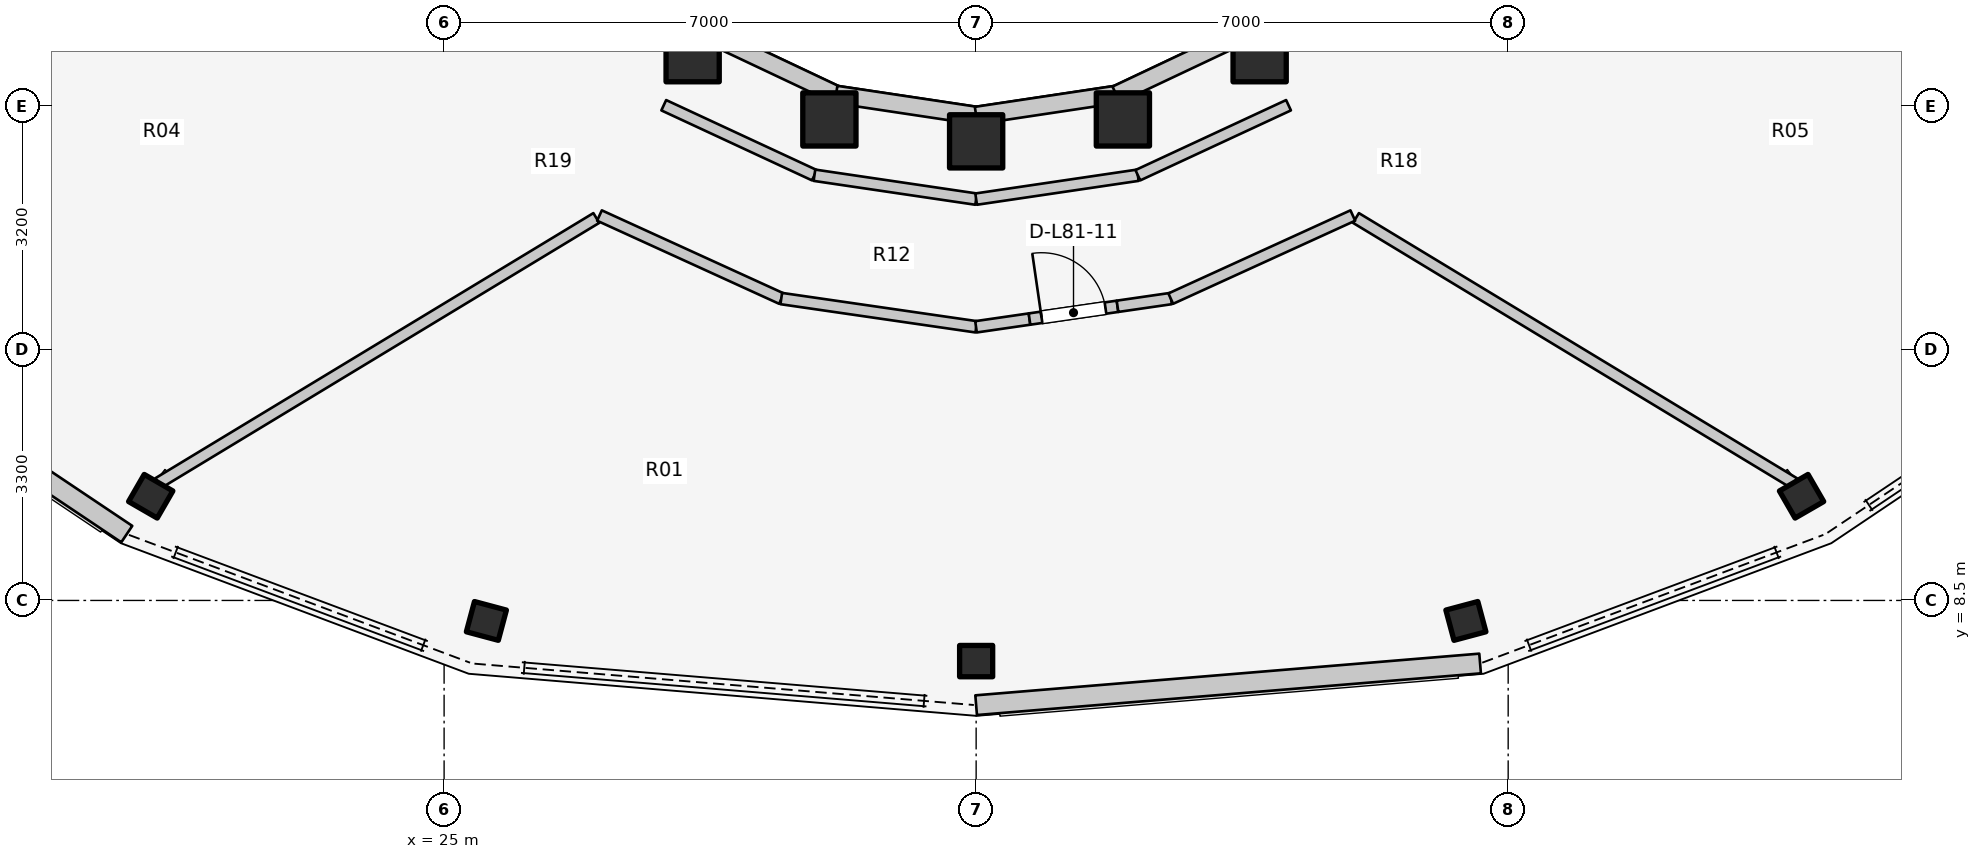
"""IFC4 building model, lengths in metres.
Left out: names, types, materials, properties, quantities, classifications, styles, units other than length and angle.
Written with IfcOpenShell. Run it as: python <this file> out.ifc"""

import sys

from ifc_helpers import new_model, si_unit, direction, frame, frame_2d, origin, origin_2d, place, context, subcontext, project, spatial, rectangle, i_section, extrude, element, fill, save


model = new_model("IFC4")
c1 = context("Model", 3, precision=1e-05, world=origin(), true_north=direction((0.0, 1.0)))
c2 = subcontext(c1, "Body", "Model", "MODEL_VIEW")
j1 = project(units=[si_unit("LENGTHUNIT", "METRE"), si_unit("PLANEANGLEUNIT", "RADIAN")], contexts=[c1])
p1 = place(None, origin())
s1 = spatial("IfcSite", under=j1, at=p1, CompositionType="ELEMENT")
p2 = place(p1, origin())
s2 = spatial("IfcBuilding", under=s1, at=p2, CompositionType="ELEMENT")
p3 = place(p2, frame((0.0, 0.0, 266.8)))
s3 = spatial("IfcBuildingStorey", under=s2, at=p3, CompositionType="ELEMENT", Elevation=266.8)
p4 = place(p3, frame((28.27, 15.673, 0.0), z_axis=(0.0, 0.0, 1.0), x_axis=(1.0, 0.0, 0.0)))
e1 = element("IfcColumn", 1, at=p4, inside=s3, PredefinedType="COLUMN", context=c2, shape_type="SweptSolid", body=[
    extrude(rectangle(XDim=0.7, YDim=0.7, at=origin_2d()), origin(), (0.0, 0.0, 1.0), 3.2),
])
p5 = place(p3, frame((21.14, 9.871, 0.0), z_axis=(0.0, 0.0, 1.0), x_axis=(-0.5, -0.866025403784, 0.0)))
e2 = element("IfcColumn", 2, at=p5, inside=s3, PredefinedType="COLUMN", context=c2, shape_type="SweptSolid", body=[
    extrude(i_section(OverallWidth=0.412, OverallDepth=0.435, WebThickness=0.036, FlangeThickness=0.057, FilletRadius=0.025, at=origin_2d()), origin(), (0.0, 0.0, 1.0), 3.2),
])
p6 = place(p3, frame((30.069, 14.828, 0.0), z_axis=(0.0, 0.0, 1.0), x_axis=(1.0, 0.0, 0.0)))
e3 = element("IfcColumn", 3, at=p6, inside=s3, PredefinedType="COLUMN", context=c2, shape_type="SweptSolid", body=[
    extrude(rectangle(XDim=0.7, YDim=0.7, at=origin_2d()), origin(), (0.0, 0.0, 1.0), 3.2),
])
p7 = place(p3, frame((25.556, 8.23, 0.0), z_axis=(0.0, 0.0, 1.0), x_axis=(-0.258819045103, -0.965925826289, 0.0)))
e4 = element("IfcColumn", 4, at=p7, inside=s3, PredefinedType="COLUMN", context=c2, shape_type="SweptSolid", body=[
    extrude(i_section(OverallWidth=0.412, OverallDepth=0.435, WebThickness=0.036, FlangeThickness=0.057, FilletRadius=0.025, at=origin_2d()), origin(), (0.0, 0.0, 1.0), 3.2),
])
p8 = place(p3, frame((32.0, 14.54, 0.0), z_axis=(0.0, 0.0, 1.0), x_axis=(1.0, 0.0, 0.0)))
e5 = element("IfcColumn", 5, at=p8, inside=s3, PredefinedType="COLUMN", context=c2, shape_type="SweptSolid", body=[
    extrude(rectangle(XDim=0.7, YDim=0.7, at=origin_2d()), origin(), (0.0, 0.0, 1.0), 3.2),
])
p9 = place(p3, frame((32.0, 7.702, 0.0), z_axis=(0.0, 0.0, 1.0), x_axis=(0.0, -1.0, 0.0)))
e6 = element("IfcColumn", 6, at=p9, inside=s3, PredefinedType="COLUMN", context=c2, shape_type="SweptSolid", body=[
    extrude(i_section(OverallWidth=0.412, OverallDepth=0.435, WebThickness=0.036, FlangeThickness=0.057, FilletRadius=0.025, at=origin_2d()), origin(), (0.0, 0.0, 1.0), 3.2),
])
p10 = place(p3, frame((33.931, 14.828, 0.0), z_axis=(0.0, 0.0, 1.0), x_axis=(1.0, 0.0, 0.0)))
e7 = element("IfcColumn", 7, at=p10, inside=s3, PredefinedType="COLUMN", context=c2, shape_type="SweptSolid", body=[
    extrude(rectangle(XDim=0.7, YDim=0.7, at=origin_2d()), origin(), (0.0, 0.0, 1.0), 3.2),
])
p11 = place(p3, frame((38.444, 8.23, 0.0), z_axis=(0.0, 0.0, 1.0), x_axis=(0.258819045103, -0.965925826289, 0.0)))
e8 = element("IfcColumn", 8, at=p11, inside=s3, PredefinedType="COLUMN", context=c2, shape_type="SweptSolid", body=[
    extrude(i_section(OverallWidth=0.412, OverallDepth=0.435, WebThickness=0.036, FlangeThickness=0.057, FilletRadius=0.025, at=origin_2d()), origin(), (0.0, 0.0, 1.0), 3.2),
])
p12 = place(p3, frame((35.73, 15.673, 0.0), z_axis=(0.0, 0.0, 1.0), x_axis=(1.0, 0.0, 0.0)))
e9 = element("IfcColumn", 9, at=p12, inside=s3, PredefinedType="COLUMN", context=c2, shape_type="SweptSolid", body=[
    extrude(rectangle(XDim=0.7, YDim=0.7, at=origin_2d()), origin(), (0.0, 0.0, 1.0), 3.2),
])
p13 = place(p3, frame((42.86, 9.871, 0.0), z_axis=(0.0, 0.0, 1.0), x_axis=(0.5, -0.866025403784, 0.0)))
e10 = element("IfcColumn", 10, at=p13, inside=s3, PredefinedType="COLUMN", context=c2, shape_type="SweptSolid", body=[
    extrude(i_section(OverallWidth=0.412, OverallDepth=0.435, WebThickness=0.036, FlangeThickness=0.057, FilletRadius=0.025, at=origin_2d()), origin(), (0.0, 0.0, 1.0), 3.2),
])
p14 = place(p3, frame((28.44, 15.968, 0.0), z_axis=(0.0, 0.0, 1.0), x_axis=(0.904179699603, -0.427152280606, 0.0)))
e11 = element("IfcWall", 11, at=p14, inside=s3, PredefinedType="STANDARD", context=c2, shape_type="SweptSolid", body=[
    extrude(rectangle(XDim=1.899, YDim=0.23, at=frame_2d((0.95, 0.0))), origin(), (0.0, 0.0, 1.0), 1.32),
])
for number, where, z_axis, x_axis in (
    (12, (30.157, 15.157, 0.0), (0.0, 0.0, 1.0), (0.989, -0.149, 0.0)),
    (13, (32.0, 14.88, 0.0), (0.0, 0.0, 1.0), (0.989, 0.149, 0.0)),
):
    element("IfcWall", number, at=place(p3, frame(where, z_axis=z_axis, x_axis=x_axis)), inside=s3, PredefinedType="STANDARD", context=c2, shape_type="SweptSolid", body=[
        extrude(rectangle(XDim=1.864, YDim=0.23, at=frame_2d((0.932, 0.0))), origin(), (0.0, 0.0, 1.0), 1.32),
    ])
p15 = place(p3, frame((33.843, 15.157, 0.0), z_axis=(0.0, 0.0, 1.0), x_axis=(0.904179699603, 0.427152280606, 0.0)))
e14 = element("IfcWall", 14, at=p15, inside=s3, PredefinedType="STANDARD", context=c2, shape_type="SweptSolid", body=[
    extrude(rectangle(XDim=1.899, YDim=0.23, at=frame_2d((0.95, 0.0))), origin(), (0.0, 0.0, 1.0), 1.32),
])
p16 = place(p3, frame((17.353, 11.7, 0.0), z_axis=(0.0, 0.0, 1.0), x_axis=(0.830699736256, -0.556720709319, 0.0)))
e15 = element("IfcWall", 15, at=p16, inside=s3, PredefinedType="STANDARD", context=c2, shape_type="SweptSolid", body=[
    extrude(rectangle(XDim=4.179, YDim=0.26, at=frame_2d((2.09, 0.0))), origin(), (0.0, 0.0, 1.0), 1.32),
])
p17 = place(p3, frame((32.0, 7.122, 0.0), z_axis=(0.0, 0.0, 1.0), x_axis=(0.996594930521, 0.08245328653, 0.0)))
e16 = element("IfcWall", 16, at=p17, inside=s3, PredefinedType="STANDARD", context=c2, shape_type="SweptSolid", body=[
    extrude(rectangle(XDim=6.653, YDim=0.26, at=frame_2d((3.327, 0.0))), origin(), (0.0, 0.0, 1.0), 1.32),
])
p18 = place(p3, frame((27.89, 15.015, 0.0), z_axis=(0.0, 0.0, 1.0), x_axis=(0.906943449489, -0.421252393975, 0.0)))
e17 = element("IfcWall", 17, at=p18, inside=s3, PredefinedType="PARTITIONING", context=c2, shape_type="SweptSolid", body=[
    extrude(rectangle(XDim=2.186, YDim=0.15, at=frame_2d((1.093, 0.0))), origin(), (0.0, 0.0, 1.0), 1.32),
])
for number, where, z_axis, x_axis in (
    (18, (29.873, 14.094, 0.0), (0.0, 0.0, 1.0), (0.989, -0.146, 0.0)),
    (19, (32.0, 13.78, 0.0), (0.0, 0.0, 1.0), (0.989, 0.146, 0.0)),
):
    element("IfcWall", number, at=place(p3, frame(where, z_axis=z_axis, x_axis=x_axis)), inside=s3, PredefinedType="PARTITIONING", context=c2, shape_type="SweptSolid", body=[
        extrude(rectangle(XDim=2.151, YDim=0.15, at=frame_2d((1.075, 0.0))), origin(), (0.0, 0.0, 1.0), 1.32),
    ])
p19 = place(p3, frame((34.127, 14.094, 0.0), z_axis=(0.0, 0.0, 1.0), x_axis=(0.906943449489, 0.421252393975, 0.0)))
e20 = element("IfcWall", 20, at=p19, inside=s3, PredefinedType="PARTITIONING", context=c2, shape_type="SweptSolid", body=[
    extrude(rectangle(XDim=2.186, YDim=0.15, at=frame_2d((1.093, 0.0))), origin(), (0.0, 0.0, 1.0), 1.32),
])
for number, where, z_axis, x_axis in (
    (21, (27.003, 13.532, 0.0), (0.0, 0.0, 1.0), (-0.856, -0.518, 0.0)),
    (22, (36.997, 13.532, 0.0), (0.0, 0.0, 1.0), (0.856, -0.518, 0.0)),
):
    element("IfcWall", number, at=place(p3, frame(where, z_axis=z_axis, x_axis=x_axis)), inside=s3, PredefinedType="PARTITIONING", context=c2, shape_type="SweptSolid", body=[
        extrude(rectangle(XDim=6.736, YDim=0.15, at=frame_2d((3.368, 0.0))), origin(), (0.0, 0.0, 1.0), 1.32),
    ])
p20 = place(p3, frame((27.044, 13.564, 0.0), z_axis=(0.0, 0.0, 1.0), x_axis=(0.909736731002, -0.415185597373, 0.0)))
e23 = element("IfcWall", 23, at=p20, inside=s3, PredefinedType="PARTITIONING", context=c2, shape_type="SweptSolid", body=[
    extrude(rectangle(XDim=2.633, YDim=0.15, at=frame_2d((1.317, 0.0))), origin(), (0.0, 0.0, 1.0), 1.32),
])
p21 = place(p3, frame((29.436, 12.472, 0.0), z_axis=(0.0, 0.0, 1.0), x_axis=(0.989661180186, -0.143425062082, 0.0)))
e24 = element("IfcWall", 24, at=p21, inside=s3, PredefinedType="PARTITIONING", context=c2, shape_type="SweptSolid", body=[
    extrude(rectangle(XDim=2.593, YDim=0.15, at=frame_2d((1.296, 0.0))), origin(), (0.0, 0.0, 1.0), 1.32),
])
p22 = place(p3, frame((31.998, 12.1, 0.0), z_axis=(0.0, 0.0, 1.0), x_axis=(0.989700813976, 0.143151314404, 0.0)))
e25 = element("IfcWall", 25, at=p22, inside=s3, PredefinedType="PARTITIONING", context=c2, shape_type="SweptSolid", body=[
    extrude(rectangle(XDim=0.711, YDim=0.15, at=frame_2d((0.355, 0.0))), origin(), (0.0, 0.0, 1.0), 1.32),
])
p23 = place(p3, frame((32.702, 12.202, 0.0), z_axis=(0.0, 0.0, 1.0), x_axis=(0.989642563126, 0.143553464776, 0.0)))
e26 = element("IfcWall", 26, at=p23, inside=s3, PredefinedType="PARTITIONING", context=c2, shape_type="SweptSolid", body=[
    extrude(rectangle(XDim=1.17, YDim=0.15, at=frame_2d((0.585, 0.0))), origin(), (0.0, 0.0, 1.0), 2.915),
])
p24 = place(p23, frame((0.16, 0.0, 0.0)))
e27 = element("IfcOpeningElement", 27, at=p24, cuts=e26, PredefinedType="OPENING", context=c2, shape_type="SweptSolid", body=[
    extrude(rectangle(XDim=0.85, YDim=2.05, at=frame_2d((0.425, 1.025))), frame((0.0, 0.085, 0.0), z_axis=(0.0, -1.0, 0.0), x_axis=(1.0, 0.0, 0.0)), (0.0, 0.0, 1.0), 0.17),
])
p25 = place(p3, frame((33.86, 12.37, 0.0), z_axis=(0.0, 0.0, 1.0), x_axis=(0.989652123174, 0.143487543353, 0.0)))
e28 = element("IfcWall", 28, at=p25, inside=s3, PredefinedType="PARTITIONING", context=c2, shape_type="SweptSolid", body=[
    extrude(rectangle(XDim=0.711, YDim=0.15, at=frame_2d((0.355, 0.0))), origin(), (0.0, 0.0, 1.0), 2.915),
])
p26 = place(p3, frame((34.561, 12.471, 0.0), z_axis=(0.0, 0.0, 1.0), x_axis=(0.909736731002, 0.415185597373, 0.0)))
e29 = element("IfcWall", 29, at=p26, inside=s3, PredefinedType="PARTITIONING", context=c2, shape_type="SweptSolid", body=[
    extrude(rectangle(XDim=2.633, YDim=0.15, at=frame_2d((1.317, 0.0))), origin(), (0.0, 0.0, 1.0), 1.32),
])
p27 = place(p24, origin())
e30 = element("IfcDoor", 30, at=p27, inside=s3, OperationType="SINGLE_SWING_LEFT", PredefinedType="DOOR", context=c2, shape_type="SweptSolid", body=[
    extrude(rectangle(XDim=0.85, YDim=2.05, at=frame_2d((0.425, 1.025))), frame((0.0, 0.025, 0.0), z_axis=(0.0, -1.0, 0.0), x_axis=(1.0, 0.0, 0.0)), (0.0, 0.0, 1.0), 0.05),
])
fill(e27, e30)
save(model, sys.argv[1])
